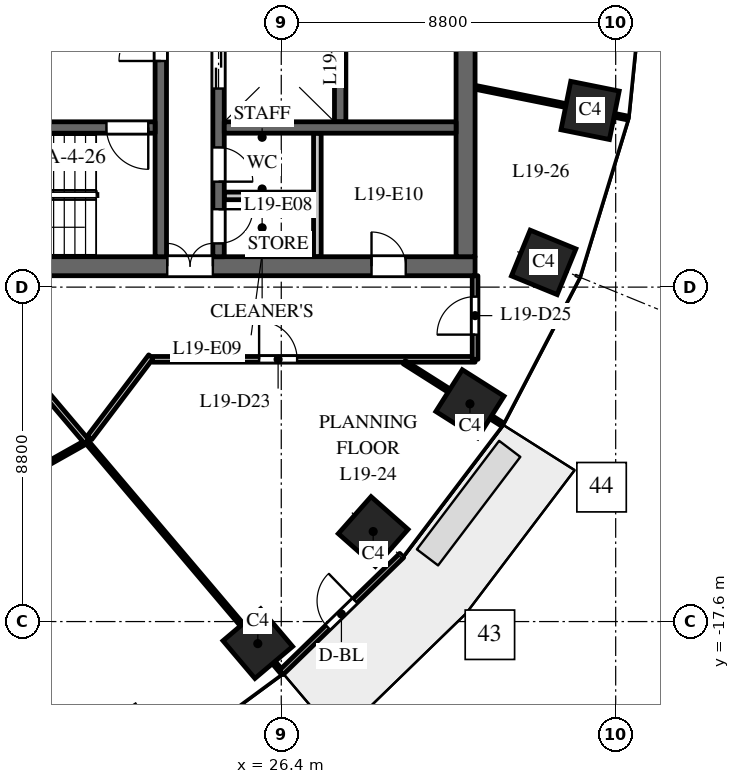
"""IFC4 building model, lengths in metres.
Left out: names, types, materials, properties, quantities, classifications, styles, units other than length and angle.
Written with IfcOpenShell. Run it as: python <this file> out.ifc"""

import sys

from ifc_helpers import new_model, si_unit, direction, frame, frame_2d, origin, origin_2d, place, context, subcontext, project, spatial, rectangle, extrude, element, fill, save


model = new_model("IFC4")
c1 = context("Model", 3, precision=1e-05, world=origin(), true_north=direction((0.0, 1.0)))
c2 = subcontext(c1, "Body", "Model", "MODEL_VIEW")
j1 = project(units=[si_unit("LENGTHUNIT", "METRE"), si_unit("PLANEANGLEUNIT", "RADIAN")], contexts=[c1])
p1 = place(None, origin())
s1 = spatial("IfcSite", under=j1, at=p1, CompositionType="ELEMENT")
p2 = place(p1, origin())
s2 = spatial("IfcBuilding", under=s1, at=p2, CompositionType="ELEMENT")
p3 = place(p2, frame((0.0, 0.0, 88.0)))
s3 = spatial("IfcBuildingStorey", under=s2, at=p3, CompositionType="ELEMENT", Elevation=88.0)
for number, where, z_axis, x_axis in (
    (1, (25.783, -18.18, 0.0), (0.0, 0.0, 1.0), (0.763, 0.646, 0.0)),
    (2, (28.819, -15.23, 0.0), (0.0, 0.0, 1.0), (0.663, 0.749, 0.0)),
    (3, (31.365, -11.871, 0.0), (0.0, 0.0, 1.0), (0.535, 0.845, 0.0)),
    (4, (33.305, -8.149, 0.0), (0.0, 0.0, 1.0), (0.379, 0.925, 0.0)),
    (5, (34.527, -4.151, 0.0), (0.0, 0.0, 1.0), (0.197, 0.98, 0.0)),
):
    element("IfcColumn", number, at=place(p3, frame(where, z_axis=z_axis, x_axis=x_axis)), inside=s3, PredefinedType="COLUMN", context=c2, shape_type="SweptSolid", body=[
        extrude(rectangle(XDim=1.3, YDim=1.3, at=origin_2d()), origin(), (0.0, 0.0, 1.0), 4.0),
    ])
p4 = place(p3, frame((16.5, -8.25, 0.0), z_axis=(0.0, 0.0, 1.0), x_axis=(1.0, 0.0, 0.0)))
e6 = element("IfcWall", 6, at=p4, inside=s3, PredefinedType="SHEAR", context=c2, shape_type="SweptSolid", body=[
    extrude(rectangle(XDim=15.0, YDim=0.5, at=frame_2d((7.5, 0.0))), origin(), (0.0, 0.0, 1.0), 3.7),
])
p5 = place(p4, frame((6.9, 0.0, 0.0)))
e7 = element("IfcOpeningElement", 7, at=p5, cuts=e6, PredefinedType="OPENING", context=c2, shape_type="SweptSolid", body=[
    extrude(rectangle(XDim=1.2, YDim=2.1, at=frame_2d((0.6, 1.05))), frame((0.0, 0.26, 0.0), z_axis=(0.0, -1.0, 0.0), x_axis=(1.0, 0.0, 0.0)), (0.0, 0.0, 1.0), 0.52),
])
p6 = place(p4, frame((12.275, 0.0, 0.0)))
e8 = element("IfcOpeningElement", 8, at=p6, cuts=e6, PredefinedType="OPENING", context=c2, shape_type="SweptSolid", body=[
    extrude(rectangle(XDim=0.9, YDim=2.1, at=frame_2d((0.45, 1.05))), frame((0.0, 0.26, 0.0), z_axis=(0.0, -1.0, 0.0), x_axis=(1.0, 0.0, 0.0)), (0.0, 0.0, 1.0), 0.52),
])
p7 = place(p3, frame((27.95, -4.45, 0.0), z_axis=(0.0, 0.0, 1.0), x_axis=(0.0, 1.0, 0.0)))
e9 = element("IfcWall", 9, at=p7, inside=s3, PredefinedType="SHEAR", context=c2, shape_type="SweptSolid", body=[
    extrude(rectangle(XDim=8.9, YDim=0.3, at=frame_2d((4.45, 0.0))), origin(), (0.0, 0.0, 1.0), 3.7),
])
p8 = place(p3, frame((24.75, -8.0, 0.0), z_axis=(0.0, 0.0, 1.0), x_axis=(0.0, 1.0, 0.0)))
e10 = element("IfcWall", 10, at=p8, inside=s3, PredefinedType="SHEAR", context=c2, shape_type="SweptSolid", body=[
    extrude(rectangle(XDim=16.0, YDim=0.3, at=frame_2d((8.0, 0.0))), origin(), (0.0, 0.0, 1.0), 3.7),
])
p9 = place(p8, frame((4.425, 0.0, 0.0)))
e11 = element("IfcOpeningElement", 11, at=p9, cuts=e10, PredefinedType="OPENING", context=c2, shape_type="SweptSolid", body=[
    extrude(rectangle(XDim=1.1, YDim=2.1, at=frame_2d((0.55, 1.05))), frame((0.0, 0.16, 0.0), z_axis=(0.0, -1.0, 0.0), x_axis=(1.0, 0.0, 0.0)), (0.0, 0.0, 1.0), 0.32),
])
p10 = place(p8, frame((7.45, 0.0, 0.0)))
e12 = element("IfcOpeningElement", 12, at=p10, cuts=e10, PredefinedType="OPENING", context=c2, shape_type="SweptSolid", body=[
    extrude(rectangle(XDim=1.1, YDim=2.1, at=frame_2d((0.55, 1.05))), frame((0.0, 0.16, 0.0), z_axis=(0.0, -1.0, 0.0), x_axis=(1.0, 0.0, 0.0)), (0.0, 0.0, 1.0), 0.32),
])
p11 = place(p8, frame((10.425, 0.0, 0.0)))
e13 = element("IfcOpeningElement", 13, at=p11, cuts=e10, PredefinedType="OPENING", context=c2, shape_type="SweptSolid", body=[
    extrude(rectangle(XDim=1.2, YDim=2.1, at=frame_2d((0.6, 1.05))), frame((0.0, 0.16, 0.0), z_axis=(0.0, -1.0, 0.0), x_axis=(1.0, 0.0, 0.0)), (0.0, 0.0, 1.0), 0.32),
])
p12 = place(p8, frame((13.75, 0.0, 0.0)))
e14 = element("IfcOpeningElement", 14, at=p12, cuts=e10, PredefinedType="OPENING", context=c2, shape_type="SweptSolid", body=[
    extrude(rectangle(XDim=0.9, YDim=2.1, at=frame_2d((0.45, 1.05))), frame((0.0, 0.16, 0.0), z_axis=(0.0, -1.0, 0.0), x_axis=(1.0, 0.0, 0.0)), (0.0, 0.0, 1.0), 0.32),
])
p13 = place(p8, frame((1.975, 0.0, 0.0)))
e15 = element("IfcOpeningElement", 15, at=p13, cuts=e10, PredefinedType="OPENING", context=c2, shape_type="SweptSolid", body=[
    extrude(rectangle(XDim=0.9, YDim=2.1, at=frame_2d((0.45, 1.05))), frame((0.0, 0.16, 0.0), z_axis=(0.0, -1.0, 0.0), x_axis=(1.0, 0.0, 0.0)), (0.0, 0.0, 1.0), 0.32),
])
p14 = place(p8, frame((0.35, 0.0, 0.0)))
e16 = element("IfcOpeningElement", 16, at=p14, cuts=e10, PredefinedType="OPENING", context=c2, shape_type="SweptSolid", body=[
    extrude(rectangle(XDim=0.9, YDim=2.1, at=frame_2d((0.45, 1.05))), frame((0.0, 0.16, 0.0), z_axis=(0.0, -1.0, 0.0), x_axis=(1.0, 0.0, 0.0)), (0.0, 0.0, 1.0), 0.32),
])
p15 = place(p3, frame((31.25, -8.0, 0.0), z_axis=(0.0, 0.0, 1.0), x_axis=(0.0, 1.0, 0.0)))
e17 = element("IfcWall", 17, at=p15, inside=s3, PredefinedType="SHEAR", context=c2, shape_type="SweptSolid", body=[
    extrude(rectangle(XDim=16.0, YDim=0.5, at=frame_2d((8.0, 0.0))), origin(), (0.0, 0.0, 1.0), 3.7),
])
p16 = place(p3, frame((27.35, -8.0, 0.0), z_axis=(0.0, 0.0, 1.0), x_axis=(0.0, 1.0, 0.0)))
e18 = element("IfcWall", 18, at=p16, inside=s3, PredefinedType="PARTITIONING", context=c2, shape_type="SweptSolid", body=[
    extrude(rectangle(XDim=3.25, YDim=0.2, at=frame_2d((1.625, 0.0))), origin(), (0.0, 0.0, 1.0), 3.7),
])
p17 = place(p3, frame((24.9, -6.4, 0.0), z_axis=(0.0, 0.0, 1.0), x_axis=(1.0, 0.0, 0.0)))
e19 = element("IfcWall", 19, at=p17, inside=s3, PredefinedType="PARTITIONING", context=c2, shape_type="SweptSolid", body=[
    extrude(rectangle(XDim=2.35, YDim=0.2, at=frame_2d((1.175, 0.0))), origin(), (0.0, 0.0, 1.0), 3.7),
])
p18 = place(p3, frame((24.9, -4.6, 0.0), z_axis=(0.0, 0.0, 1.0), x_axis=(1.0, 0.0, 0.0)))
e20 = element("IfcWall", 20, at=p18, inside=s3, PredefinedType="SHEAR", context=c2, shape_type="SweptSolid", body=[
    extrude(rectangle(XDim=6.1, YDim=0.3, at=frame_2d((3.05, 0.0))), origin(), (0.0, 0.0, 1.0), 3.7),
])
p19 = place(p3, frame((23.23, -8.0, 0.0), z_axis=(0.0, 0.0, 1.0), x_axis=(0.0, 1.0, 0.0)))
e21 = element("IfcWall", 21, at=p19, inside=s3, PredefinedType="SHEAR", context=c2, shape_type="SweptSolid", body=[
    extrude(rectangle(XDim=7.875, YDim=0.3, at=frame_2d((3.938, 0.0))), origin(), (0.0, 0.0, 1.0), 3.7),
])
p20 = place(p19, frame((5.15, 0.0, 0.0)))
e22 = element("IfcOpeningElement", 22, at=p20, cuts=e21, PredefinedType="OPENING", context=c2, shape_type="SweptSolid", body=[
    extrude(rectangle(XDim=1.1, YDim=2.1, at=frame_2d((0.55, 1.05))), frame((0.0, 0.16, 0.0), z_axis=(0.0, -1.0, 0.0), x_axis=(1.0, 0.0, 0.0)), (0.0, 0.0, 1.0), 0.32),
])
p21 = place(p3, frame((16.9, -4.6, 0.0), z_axis=(0.0, 0.0, 1.0), x_axis=(1.0, 0.0, 0.0)))
e23 = element("IfcWall", 23, at=p21, inside=s3, PredefinedType="SHEAR", context=c2, shape_type="SweptSolid", body=[
    extrude(rectangle(XDim=6.18, YDim=0.3, at=frame_2d((3.09, 0.0))), origin(), (0.0, 0.0, 1.0), 3.7),
])
p22 = place(p21, frame((4.9, 0.0, 0.0)))
e24 = element("IfcOpeningElement", 24, at=p22, cuts=e23, PredefinedType="OPENING", context=c2, shape_type="SweptSolid", body=[
    extrude(rectangle(XDim=1.1, YDim=2.1, at=frame_2d((0.55, 1.05))), frame((0.0, 0.16, 0.0), z_axis=(0.0, -1.0, 0.0), x_axis=(1.0, 0.0, 0.0)), (0.0, 0.0, 1.0), 0.32),
])
p23 = place(p3, frame((26.396, -18.943, 0.0), z_axis=(0.0, 0.0, 1.0), x_axis=(0.717214761864, 0.696852197647, 0.0)))
e25 = element("IfcWall", 25, at=p23, inside=s3, PredefinedType="STANDARD", context=c2, shape_type="SweptSolid", body=[
    extrude(rectangle(XDim=4.424, YDim=0.15, at=frame_2d((2.212, 0.0))), origin(), (0.0, 0.0, 1.0), 3.7),
])
p24 = place(p23, frame((1.712, 0.0, 0.0)))
e26 = element("IfcOpeningElement", 26, at=p24, cuts=e25, PredefinedType="OPENING", context=c2, shape_type="SweptSolid", body=[
    extrude(rectangle(XDim=1.0, YDim=2.4, at=frame_2d((0.5, 1.2))), frame((0.0, 0.085, 0.0), z_axis=(0.0, -1.0, 0.0), x_axis=(1.0, 0.0, 0.0)), (0.0, 0.0, 1.0), 0.17),
])
p25 = place(p3, frame((12.478, -17.822, 0.0), z_axis=(0.0, 0.0, 1.0), x_axis=(0.871366973315, 0.490631835306, 0.0)))
e27 = element("IfcWall", 27, at=p25, inside=s3, PredefinedType="PARTITIONING", context=c2, shape_type="SweptSolid", body=[
    extrude(rectangle(XDim=10.101, YDim=0.1, at=frame_2d((5.051, 0.0))), origin(), (0.0, 0.0, 1.0), 3.7),
])
p26 = place(p3, frame((19.511, -10.778, 0.0), z_axis=(0.0, 0.0, 1.0), x_axis=(0.64641426768, -0.762986628021, 0.0)))
e28 = element("IfcWall", 28, at=p26, inside=s3, PredefinedType="PARTITIONING", context=c2, shape_type="SweptSolid", body=[
    extrude(rectangle(XDim=2.735, YDim=0.15, at=frame_2d((1.368, 0.0))), origin(), (0.0, 0.0, 1.0), 3.7),
])
p27 = place(p3, frame((21.355, -12.765, 0.0), z_axis=(0.0, 0.0, 1.0), x_axis=(0.603391001626, 0.797445483502, 0.0)))
e29 = element("IfcWall", 29, at=p27, inside=s3, PredefinedType="PARTITIONING", context=c2, shape_type="SweptSolid", body=[
    extrude(rectangle(XDim=2.68, YDim=0.15, at=frame_2d((1.34, 0.0))), origin(), (0.0, 0.0, 1.0), 2.75),
])
p28 = place(p3, frame((21.279, -12.865, 0.0), z_axis=(0.0, 0.0, 1.0), x_axis=(0.646395355102, -0.763002650652, 0.0)))
e30 = element("IfcWall", 30, at=p28, inside=s3, PredefinedType="PARTITIONING", context=c2, shape_type="SweptSolid", body=[
    extrude(rectangle(XDim=7.969, YDim=0.1, at=frame_2d((3.984, 0.0))), origin(), (0.0, 0.0, 1.0), 2.9),
])
p29 = place(p3, frame((23.011, -10.7, 0.0), z_axis=(0.0, 0.0, 1.0), x_axis=(1.0, 0.0, 0.0)))
e31 = element("IfcWall", 31, at=p29, inside=s3, PredefinedType="PARTITIONING", context=c2, shape_type="SweptSolid", body=[
    extrude(rectangle(XDim=8.489, YDim=0.15, at=frame_2d((4.245, 0.0))), origin(), (0.0, 0.0, 1.0), 2.9),
])
p30 = place(p29, frame((2.806, 0.0, 0.0)))
e32 = element("IfcOpeningElement", 32, at=p30, cuts=e31, PredefinedType="OPENING", context=c2, shape_type="SweptSolid", body=[
    extrude(rectangle(XDim=1.0, YDim=2.1, at=frame_2d((0.5, 1.05))), frame((0.0, 0.085, 0.0), z_axis=(0.0, -1.0, 0.0), x_axis=(1.0, 0.0, 0.0)), (0.0, 0.0, 1.0), 0.17),
])
p31 = place(p3, frame((29.637, -10.777, 0.0), z_axis=(0.0, 0.0, 1.0), x_axis=(0.844810627195, -0.535065420467, 0.0)))
e33 = element("IfcWall", 33, at=p31, inside=s3, PredefinedType="PARTITIONING", context=c2, shape_type="SweptSolid", body=[
    extrude(rectangle(XDim=3.048, YDim=0.1, at=frame_2d((1.524, 0.0))), origin(), (0.0, 0.0, 1.0), 2.9),
])
p32 = place(p3, frame((31.5, -10.7, 0.0), z_axis=(0.0, 0.0, 1.0), x_axis=(0.0, 1.0, 0.0)))
e34 = element("IfcWall", 34, at=p32, inside=s3, PredefinedType="PARTITIONING", context=c2, shape_type="SweptSolid", body=[
    extrude(rectangle(XDim=2.2, YDim=0.15, at=frame_2d((1.1, 0.0))), origin(), (0.0, 0.0, 1.0), 2.9),
])
p33 = place(p32, frame((0.65, 0.0, 0.0)))
e35 = element("IfcOpeningElement", 35, at=p33, cuts=e34, PredefinedType="OPENING", context=c2, shape_type="SweptSolid", body=[
    extrude(rectangle(XDim=1.0, YDim=2.1, at=frame_2d((0.5, 1.05))), frame((0.0, 0.085, 0.0), z_axis=(0.0, -1.0, 0.0), x_axis=(1.0, 0.0, 0.0)), (0.0, 0.0, 1.0), 0.17),
])
p34 = place(p3, frame((31.5, -3.542, 0.0), z_axis=(0.0, 0.0, 1.0), x_axis=(0.980357474535, -0.197228857227, 0.0)))
e36 = element("IfcWall", 36, at=p34, inside=s3, PredefinedType="PARTITIONING", context=c2, shape_type="SweptSolid", body=[
    extrude(rectangle(XDim=4.092, YDim=0.1, at=frame_2d((2.046, 0.0))), origin(), (0.0, 0.0, 1.0), 2.9),
])
p35 = place(p9, origin())
e37 = element("IfcDoor", 37, at=p35, inside=s3, OperationType="DOUBLE_DOOR_SLIDING", PredefinedType="DOOR", context=c2, shape_type="SweptSolid", body=[
    extrude(rectangle(XDim=1.1, YDim=2.1, at=frame_2d((0.55, 1.05))), frame((0.0, 0.025, 0.0), z_axis=(0.0, -1.0, 0.0), x_axis=(1.0, 0.0, 0.0)), (0.0, 0.0, 1.0), 0.05),
])
fill(e11, e37)
p36 = place(p22, origin())
e38 = element("IfcDoor", 38, at=p36, inside=s3, OperationType="SINGLE_SWING_RIGHT", PredefinedType="DOOR", context=c2, shape_type="SweptSolid", body=[
    extrude(rectangle(XDim=1.1, YDim=2.1, at=frame_2d((0.55, 1.05))), frame((0.0, 0.025, 0.0), z_axis=(0.0, -1.0, 0.0), x_axis=(1.0, 0.0, 0.0)), (0.0, 0.0, 1.0), 0.05),
])
fill(e24, e38)
p37 = place(p20, origin())
e39 = element("IfcDoor", 39, at=p37, inside=s3, OperationType="SINGLE_SWING_RIGHT", PredefinedType="DOOR", context=c2, shape_type="SweptSolid", body=[
    extrude(rectangle(XDim=1.1, YDim=2.1, at=frame_2d((0.55, 1.05))), frame((0.0, 0.025, 0.0), z_axis=(0.0, -1.0, 0.0), x_axis=(1.0, 0.0, 0.0)), (0.0, 0.0, 1.0), 0.05),
])
fill(e22, e39)
p38 = place(p5, origin())
e40 = element("IfcDoor", 40, at=p38, inside=s3, OperationType="DOUBLE_DOOR_DOUBLE_SWING", PredefinedType="DOOR", context=c2, shape_type="SweptSolid", body=[
    extrude(rectangle(XDim=1.2, YDim=2.1, at=frame_2d((0.6, 1.05))), frame((0.0, 0.025, 0.0), z_axis=(0.0, -1.0, 0.0), x_axis=(1.0, 0.0, 0.0)), (0.0, 0.0, 1.0), 0.05),
])
fill(e7, e40)
p39 = place(p13, origin())
e41 = element("IfcDoor", 41, at=p39, inside=s3, OperationType="SINGLE_SWING_LEFT", PredefinedType="DOOR", context=c2, shape_type="SweptSolid", body=[
    extrude(rectangle(XDim=0.9, YDim=2.1, at=frame_2d((0.45, 1.05))), frame((0.0, 0.025, 0.0), z_axis=(0.0, -1.0, 0.0), x_axis=(1.0, 0.0, 0.0)), (0.0, 0.0, 1.0), 0.05),
])
fill(e15, e41)
p40 = place(p14, origin())
e42 = element("IfcDoor", 42, at=p40, inside=s3, OperationType="SINGLE_SWING_RIGHT", PredefinedType="DOOR", context=c2, shape_type="SweptSolid", body=[
    extrude(rectangle(XDim=0.9, YDim=2.1, at=frame_2d((0.45, 1.05))), frame((0.0, 0.025, 0.0), z_axis=(0.0, -1.0, 0.0), x_axis=(1.0, 0.0, 0.0)), (0.0, 0.0, 1.0), 0.05),
])
fill(e16, e42)
p41 = place(p6, origin())
e43 = element("IfcDoor", 43, at=p41, inside=s3, OperationType="SINGLE_SWING_RIGHT", PredefinedType="DOOR", context=c2, shape_type="SweptSolid", body=[
    extrude(rectangle(XDim=0.9, YDim=2.1, at=frame_2d((0.45, 1.05))), frame((0.0, 0.025, 0.0), z_axis=(0.0, -1.0, 0.0), x_axis=(1.0, 0.0, 0.0)), (0.0, 0.0, 1.0), 0.05),
])
fill(e8, e43)
p42 = place(p24, origin())
e44 = element("IfcDoor", 44, at=p42, inside=s3, OperationType="SINGLE_SWING_RIGHT", PredefinedType="DOOR", context=c2, shape_type="SweptSolid", body=[
    extrude(rectangle(XDim=1.0, YDim=2.4, at=frame_2d((0.5, 1.2))), frame((0.0, 0.025, 0.0), z_axis=(0.0, -1.0, 0.0), x_axis=(1.0, 0.0, 0.0)), (0.0, 0.0, 1.0), 0.05),
])
fill(e26, e44)
p43 = place(p30, origin())
e45 = element("IfcDoor", 45, at=p43, inside=s3, OperationType="SINGLE_SWING_LEFT", PredefinedType="DOOR", context=c2, shape_type="SweptSolid", body=[
    extrude(rectangle(XDim=1.0, YDim=2.1, at=frame_2d((0.5, 1.05))), frame((0.0, 0.025, 0.0), z_axis=(0.0, -1.0, 0.0), x_axis=(1.0, 0.0, 0.0)), (0.0, 0.0, 1.0), 0.05),
])
fill(e32, e45)
p44 = place(p33, origin())
e46 = element("IfcDoor", 46, at=p44, inside=s3, OperationType="SINGLE_SWING_LEFT", PredefinedType="DOOR", context=c2, shape_type="SweptSolid", body=[
    extrude(rectangle(XDim=1.0, YDim=2.1, at=frame_2d((0.5, 1.05))), frame((0.0, 0.025, 0.0), z_axis=(0.0, -1.0, 0.0), x_axis=(1.0, 0.0, 0.0)), (0.0, 0.0, 1.0), 0.05),
])
fill(e35, e46)
save(model, sys.argv[1])
